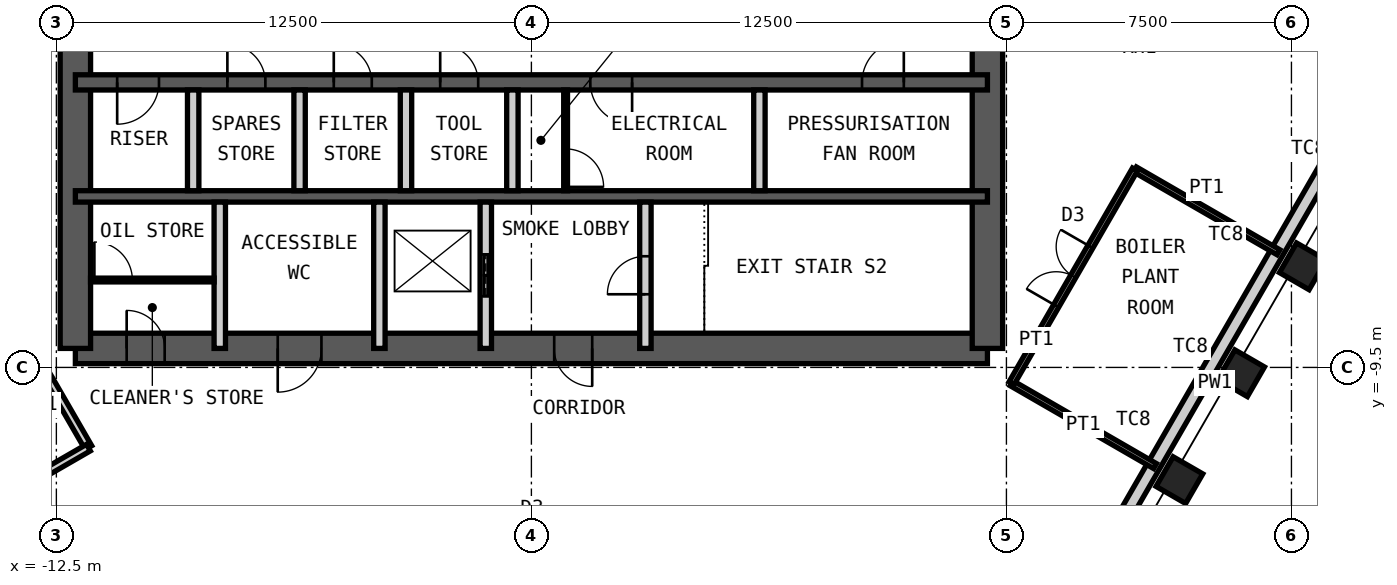
"""IFC4 building model, lengths in metres.
Left out: names, types, materials, properties, quantities, classifications, styles, units other than length and angle.
Written with IfcOpenShell. Run it as: python <this file> out.ifc"""

import sys

from ifc_helpers import new_model, si_unit, direction, frame, frame_2d, origin, origin_2d, place, context, subcontext, project, spatial, rectangle, hollow_rectangle, extrude, element, fill, save


model = new_model("IFC4")
c1 = context("Model", 3, precision=1e-05, world=origin(), true_north=direction((0.0, 1.0)))
c2 = subcontext(c1, "Body", "Model", "MODEL_VIEW")
j1 = project(units=[si_unit("LENGTHUNIT", "METRE"), si_unit("PLANEANGLEUNIT", "RADIAN")], contexts=[c1])
p1 = place(None, origin())
s1 = spatial("IfcSite", under=j1, at=p1, CompositionType="ELEMENT")
p2 = place(p1, origin())
s2 = spatial("IfcBuilding", under=s1, at=p2, CompositionType="ELEMENT")
p3 = place(p2, frame((0.0, 0.0, 343.6)))
s3 = spatial("IfcBuildingStorey", under=s2, at=p3, CompositionType="ELEMENT", Elevation=343.6)
for number, where, z_axis, x_axis in (
    (1, (20.3, -6.84, 0.0), (0.0, 0.0, 1.0), (0.5, 0.866, 0.0)),
    (2, (18.676, -9.653, 0.0), (0.0, 0.0, 1.0), (0.5, 0.866, 0.0)),
    (3, (17.052, -12.466, 0.0), (0.0, 0.0, 1.0), (0.5, 0.866, 0.0)),
):
    element("IfcColumn", number, at=place(p3, frame(where, z_axis=z_axis, x_axis=x_axis)), inside=s3, PredefinedType="COLUMN", context=c2, shape_type="SweptSolid", body=[
        extrude(hollow_rectangle(XDim=0.9, YDim=0.9, WallThickness=0.05, at=origin_2d()), origin(), (0.0, 0.0, 1.0), 4.65),
    ])
p4 = place(p3, frame((-12.0, -9.0, 0.0), z_axis=(0.0, 0.0, 1.0), x_axis=(1.0, 0.0, 0.0)))
e4 = element("IfcWall", 4, at=p4, inside=s3, PredefinedType="SHEAR", context=c2, shape_type="SweptSolid", body=[
    extrude(rectangle(XDim=24.0, YDim=0.8, at=frame_2d((12.0, 0.0))), origin(), (0.0, 0.0, 1.0), 4.65),
])
p5 = place(p4, frame((1.35, 0.0, 0.0)))
e5 = element("IfcOpeningElement", 5, at=p5, cuts=e4, PredefinedType="OPENING", context=c2, shape_type="SweptSolid", body=[
    extrude(rectangle(XDim=1.0, YDim=2.1, at=frame_2d((0.5, 1.05))), frame((0.0, 0.41, 0.0), z_axis=(0.0, -1.0, 0.0), x_axis=(1.0, 0.0, 0.0)), (0.0, 0.0, 1.0), 0.82),
])
p6 = place(p4, frame((5.325, 0.0, 0.0)))
e6 = element("IfcOpeningElement", 6, at=p6, cuts=e4, PredefinedType="OPENING", context=c2, shape_type="SweptSolid", body=[
    extrude(rectangle(XDim=1.15, YDim=2.1, at=frame_2d((0.575, 1.05))), frame((0.0, 0.41, 0.0), z_axis=(0.0, -1.0, 0.0), x_axis=(1.0, 0.0, 0.0)), (0.0, 0.0, 1.0), 0.82),
])
p7 = place(p4, frame((12.6, 0.0, 0.0)))
e7 = element("IfcOpeningElement", 7, at=p7, cuts=e4, PredefinedType="OPENING", context=c2, shape_type="SweptSolid", body=[
    extrude(rectangle(XDim=1.0, YDim=2.1, at=frame_2d((0.5, 1.05))), frame((0.0, 0.41, 0.0), z_axis=(0.0, -1.0, 0.0), x_axis=(1.0, 0.0, 0.0)), (0.0, 0.0, 1.0), 0.82),
])
p8 = place(p3, frame((12.0, -9.0, 0.0), z_axis=(0.0, 0.0, 1.0), x_axis=(0.0, 1.0, 0.0)))
e8 = element("IfcWall", 8, at=p8, inside=s3, PredefinedType="SHEAR", context=c2, shape_type="SweptSolid", body=[
    extrude(rectangle(XDim=18.0, YDim=0.8, at=frame_2d((9.0, 0.0))), origin(), (0.0, 0.0, 1.0), 4.65),
])
p9 = place(p8, frame((8.1, 0.0, 0.0)))
e9 = element("IfcOpeningElement", 9, at=p9, cuts=e8, PredefinedType="OPENING", context=c2, shape_type="SweptSolid", body=[
    extrude(rectangle(XDim=1.8, YDim=2.1, at=frame_2d((0.9, 1.05))), frame((0.0, 0.41, 0.0), z_axis=(0.0, -1.0, 0.0), x_axis=(1.0, 0.0, 0.0)), (0.0, 0.0, 1.0), 0.82),
])
p10 = place(p3, frame((-12.0, -9.0, 0.0), z_axis=(0.0, 0.0, 1.0), x_axis=(0.0, 1.0, 0.0)))
e10 = element("IfcWall", 10, at=p10, inside=s3, PredefinedType="SHEAR", context=c2, shape_type="SweptSolid", body=[
    extrude(rectangle(XDim=18.0, YDim=0.8, at=frame_2d((9.0, 0.0))), origin(), (0.0, 0.0, 1.0), 4.65),
])
p11 = place(p10, frame((8.1, 0.0, 0.0)))
e11 = element("IfcOpeningElement", 11, at=p11, cuts=e10, PredefinedType="OPENING", context=c2, shape_type="SweptSolid", body=[
    extrude(rectangle(XDim=1.8, YDim=2.1, at=frame_2d((0.9, 1.05))), frame((0.0, 0.41, 0.0), z_axis=(0.0, -1.0, 0.0), x_axis=(1.0, 0.0, 0.0)), (0.0, 0.0, 1.0), 0.82),
])
p12 = place(p3, frame((-12.0, -2.0, 0.0), z_axis=(0.0, 0.0, 1.0), x_axis=(1.0, 0.0, 0.0)))
e12 = element("IfcWall", 12, at=p12, inside=s3, PredefinedType="SHEAR", context=c2, shape_type="SweptSolid", body=[
    extrude(rectangle(XDim=24.0, YDim=0.4, at=frame_2d((12.0, 0.0))), origin(), (0.0, 0.0, 1.0), 4.65),
])
p13 = place(p12, frame((1.1, 0.0, 0.0)))
e13 = element("IfcOpeningElement", 13, at=p13, cuts=e12, PredefinedType="OPENING", context=c2, shape_type="SweptSolid", body=[
    extrude(rectangle(XDim=1.1, YDim=2.1, at=frame_2d((0.55, 1.05))), frame((0.0, 0.21, 0.0), z_axis=(0.0, -1.0, 0.0), x_axis=(1.0, 0.0, 0.0)), (0.0, 0.0, 1.0), 0.42),
])
p14 = place(p12, frame((13.55, 0.0, 0.0)))
e14 = element("IfcOpeningElement", 14, at=p14, cuts=e12, PredefinedType="OPENING", context=c2, shape_type="SweptSolid", body=[
    extrude(rectangle(XDim=1.1, YDim=2.1, at=frame_2d((0.55, 1.05))), frame((0.0, 0.21, 0.0), z_axis=(0.0, -1.0, 0.0), x_axis=(1.0, 0.0, 0.0)), (0.0, 0.0, 1.0), 0.42),
])
p15 = place(p12, frame((20.7, 0.0, 0.0)))
e15 = element("IfcOpeningElement", 15, at=p15, cuts=e12, PredefinedType="OPENING", context=c2, shape_type="SweptSolid", body=[
    extrude(rectangle(XDim=1.1, YDim=2.1, at=frame_2d((0.55, 1.05))), frame((0.0, 0.21, 0.0), z_axis=(0.0, -1.0, 0.0), x_axis=(1.0, 0.0, 0.0)), (0.0, 0.0, 1.0), 0.42),
])
p16 = place(p12, frame((4.0, 0.0, 0.0)))
e16 = element("IfcOpeningElement", 16, at=p16, cuts=e12, PredefinedType="OPENING", context=c2, shape_type="SweptSolid", body=[
    extrude(rectangle(XDim=1.0, YDim=2.1, at=frame_2d((0.5, 1.05))), frame((0.0, 0.21, 0.0), z_axis=(0.0, -1.0, 0.0), x_axis=(1.0, 0.0, 0.0)), (0.0, 0.0, 1.0), 0.42),
])
p17 = place(p12, frame((6.8, 0.0, 0.0)))
e17 = element("IfcOpeningElement", 17, at=p17, cuts=e12, PredefinedType="OPENING", context=c2, shape_type="SweptSolid", body=[
    extrude(rectangle(XDim=1.0, YDim=2.1, at=frame_2d((0.5, 1.05))), frame((0.0, 0.21, 0.0), z_axis=(0.0, -1.0, 0.0), x_axis=(1.0, 0.0, 0.0)), (0.0, 0.0, 1.0), 0.42),
])
p18 = place(p12, frame((9.6, 0.0, 0.0)))
e18 = element("IfcOpeningElement", 18, at=p18, cuts=e12, PredefinedType="OPENING", context=c2, shape_type="SweptSolid", body=[
    extrude(rectangle(XDim=1.0, YDim=2.1, at=frame_2d((0.5, 1.05))), frame((0.0, 0.21, 0.0), z_axis=(0.0, -1.0, 0.0), x_axis=(1.0, 0.0, 0.0)), (0.0, 0.0, 1.0), 0.42),
])
p19 = place(p3, frame((-12.0, -5.0, 0.0), z_axis=(0.0, 0.0, 1.0), x_axis=(1.0, 0.0, 0.0)))
e19 = element("IfcWall", 19, at=p19, inside=s3, PredefinedType="SHEAR", context=c2, shape_type="SweptSolid", body=[
    extrude(rectangle(XDim=24.0, YDim=0.3, at=frame_2d((12.0, 0.0))), origin(), (0.0, 0.0, 1.0), 4.65),
])
for number, where, z_axis, x_axis in (
    (20, (-8.9, -4.85, 0.0), (0.0, 0.0, 1.0), (0.0, 1.0, 0.0)),
    (21, (-6.1, -4.85, 0.0), (0.0, 0.0, 1.0), (0.0, 1.0, 0.0)),
    (22, (-3.3, -4.85, 0.0), (0.0, 0.0, 1.0), (0.0, 1.0, 0.0)),
):
    element("IfcWall", number, at=place(p3, frame(where, z_axis=z_axis, x_axis=x_axis)), inside=s3, PredefinedType="PARTITIONING", context=c2, shape_type="SweptSolid", body=[
        extrude(rectangle(XDim=2.65, YDim=0.3, at=frame_2d((1.325, 0.0))), origin(), (0.0, 0.0, 1.0), 4.65),
    ])
p20 = place(p3, frame((-0.5, -4.85, 0.0), z_axis=(0.0, 0.0, 1.0), x_axis=(0.0, 1.0, 0.0)))
e23 = element("IfcWall", 23, at=p20, inside=s3, PredefinedType="PARTITIONING", context=c2, shape_type="SweptSolid", body=[
    extrude(rectangle(XDim=2.65, YDim=0.3, at=frame_2d((1.325, 0.0))), origin(), (0.0, 0.0, 1.0), 3.65),
])
p21 = place(p3, frame((6.0, -4.85, 0.0), z_axis=(0.0, 0.0, 1.0), x_axis=(0.0, 1.0, 0.0)))
e24 = element("IfcWall", 24, at=p21, inside=s3, PredefinedType="PARTITIONING", context=c2, shape_type="SweptSolid", body=[
    extrude(rectangle(XDim=2.65, YDim=0.3, at=frame_2d((1.325, 0.0))), origin(), (0.0, 0.0, 1.0), 4.65),
])
for number, where, z_axis, x_axis in (
    (25, (-8.2, -9.0, 0.0), (0.0, 0.0, 1.0), (0.0, 1.0, 0.0)),
    (26, (-4.0, -9.0, 0.0), (0.0, 0.0, 1.0), (0.0, 1.0, 0.0)),
):
    element("IfcWall", number, at=place(p3, frame(where, z_axis=z_axis, x_axis=x_axis)), inside=s3, PredefinedType="PARTITIONING", context=c2, shape_type="SweptSolid", body=[
        extrude(rectangle(XDim=3.85, YDim=0.3, at=frame_2d((1.925, 0.0))), origin(), (0.0, 0.0, 1.0), 4.65),
    ])
p22 = place(p3, frame((-1.2, -9.0, 0.0), z_axis=(0.0, 0.0, 1.0), x_axis=(0.0, 1.0, 0.0)))
e27 = element("IfcWall", 27, at=p22, inside=s3, PredefinedType="PARTITIONING", context=c2, shape_type="SweptSolid", body=[
    extrude(rectangle(XDim=3.85, YDim=0.3, at=frame_2d((1.925, 0.0))), origin(), (0.0, 0.0, 1.0), 4.65),
])
p23 = place(p22, frame((1.375, 0.0, 0.0)))
e28 = element("IfcOpeningElement", 28, at=p23, cuts=e27, PredefinedType="OPENING", context=c2, shape_type="SweptSolid", body=[
    extrude(rectangle(XDim=1.1, YDim=2.4, at=frame_2d((0.55, 1.2))), frame((0.0, 0.16, 0.0), z_axis=(0.0, -1.0, 0.0), x_axis=(1.0, 0.0, 0.0)), (0.0, 0.0, 1.0), 0.32),
])
p24 = place(p3, frame((3.0, -9.0, 0.0), z_axis=(0.0, 0.0, 1.0), x_axis=(0.0, 1.0, 0.0)))
e29 = element("IfcWall", 29, at=p24, inside=s3, PredefinedType="PARTITIONING", context=c2, shape_type="SweptSolid", body=[
    extrude(rectangle(XDim=3.85, YDim=0.3, at=frame_2d((1.925, 0.0))), origin(), (0.0, 0.0, 1.0), 4.65),
])
p25 = place(p24, frame((1.425, 0.0, 0.0)))
e30 = element("IfcOpeningElement", 30, at=p25, cuts=e29, PredefinedType="OPENING", context=c2, shape_type="SweptSolid", body=[
    extrude(rectangle(XDim=1.0, YDim=2.1, at=frame_2d((0.5, 1.05))), frame((0.0, 0.16, 0.0), z_axis=(0.0, -1.0, 0.0), x_axis=(1.0, 0.0, 0.0)), (0.0, 0.0, 1.0), 0.32),
])
for number, where, z_axis, x_axis in (
    (31, (22.634, -1.246, 5.0), (0.0, 0.0, 1.0), (-0.5, -0.866, 0.0)),
    (32, (-12.396, -18.979, 5.0), (0.0, 0.0, 1.0), (-0.5, 0.866, 0.0)),
):
    element("IfcWall", number, at=place(p3, frame(where, z_axis=z_axis, x_axis=x_axis)), inside=s3, PredefinedType="PARAPET", context=c2, shape_type="SweptSolid", body=[
        extrude(rectangle(XDim=18.592, YDim=0.35, at=frame_2d((9.296, 0.0))), origin(), (0.0, 0.0, 1.0), 1.2),
    ])
p26 = place(p3, frame((0.9, -4.85, 0.0), z_axis=(0.0, 0.0, 1.0), x_axis=(0.0, 1.0, 0.0)))
e33 = element("IfcWall", 33, at=p26, inside=s3, PredefinedType="PARTITIONING", context=c2, shape_type="SweptSolid", body=[
    extrude(rectangle(XDim=2.65, YDim=0.1, at=frame_2d((1.325, 0.0))), origin(), (0.0, 0.0, 1.0), 5.0),
])
p27 = place(p26, frame((0.1, 0.0, 0.0)))
e34 = element("IfcOpeningElement", 34, at=p27, cuts=e33, PredefinedType="OPENING", context=c2, shape_type="SweptSolid", body=[
    extrude(rectangle(XDim=1.0, YDim=2.4, at=frame_2d((0.5, 1.2))), frame((0.0, 0.06, 0.0), z_axis=(0.0, -1.0, 0.0), x_axis=(1.0, 0.0, 0.0)), (0.0, 0.0, 1.0), 0.12),
])
p28 = place(p3, frame((-11.6, -7.2, 0.0), z_axis=(0.0, 0.0, 1.0), x_axis=(1.0, 0.0, 0.0)))
e35 = element("IfcWall", 35, at=p28, inside=s3, PredefinedType="PARTITIONING", context=c2, shape_type="SweptSolid", body=[
    extrude(rectangle(XDim=3.25, YDim=0.1, at=frame_2d((1.625, 0.0))), origin(), (0.0, 0.0, 1.0), 5.0),
])
p29 = place(p28, frame((0.1, 0.0, 0.0)))
e36 = element("IfcOpeningElement", 36, at=p29, cuts=e35, PredefinedType="OPENING", context=c2, shape_type="SweptSolid", body=[
    extrude(rectangle(XDim=1.0, YDim=2.4, at=frame_2d((0.5, 1.2))), frame((0.0, 0.06, 0.0), z_axis=(0.0, -1.0, 0.0), x_axis=(1.0, 0.0, 0.0)), (0.0, 0.0, 1.0), 0.12),
])
p30 = place(p3, frame((19.659, -6.47, 0.0), z_axis=(0.0, 0.0, 1.0), x_axis=(-0.866032659912, 0.499987431809, 0.0)))
e37 = element("IfcWall", 37, at=p30, inside=s3, PredefinedType="PARTITIONING", context=c2, shape_type="SweptSolid", body=[
    extrude(rectangle(XDim=4.36, YDim=0.15, at=frame_2d((2.18, 0.0))), origin(), (0.0, 0.0, 1.0), 4.65),
])
p31 = place(p3, frame((16.411, -12.096, 0.0), z_axis=(0.0, 0.0, 1.0), x_axis=(-0.866032659912, 0.499987431809, 0.0)))
e38 = element("IfcWall", 38, at=p31, inside=s3, PredefinedType="PARTITIONING", context=c2, shape_type="SweptSolid", body=[
    extrude(rectangle(XDim=4.36, YDim=0.15, at=frame_2d((2.18, 0.0))), origin(), (0.0, 0.0, 1.0), 3.75),
])
p32 = place(p3, frame((15.883, -4.29, 0.0), z_axis=(0.0, 0.0, 1.0), x_axis=(-0.500003318956, -0.866023487576, 0.0)))
e39 = element("IfcWall", 39, at=p32, inside=s3, PredefinedType="PARTITIONING", context=c2, shape_type="SweptSolid", body=[
    extrude(rectangle(XDim=6.496, YDim=0.15, at=frame_2d((3.248, 0.0))), origin(), (0.0, 0.0, 1.0), 4.65),
])
p33 = place(p32, frame((2.348, 0.0, 0.0)))
e40 = element("IfcOpeningElement", 40, at=p33, cuts=e39, PredefinedType="OPENING", context=c2, shape_type="SweptSolid", body=[
    extrude(rectangle(XDim=1.8, YDim=2.4, at=frame_2d((0.9, 1.2))), frame((0.0, 0.085, 0.0), z_axis=(0.0, -1.0, 0.0), x_axis=(1.0, 0.0, 0.0)), (0.0, 0.0, 1.0), 0.17),
])
p34 = place(p3, frame((-11.657, -11.61, 0.0), z_axis=(0.0, 0.0, 1.0), x_axis=(-0.500003318956, 0.866023487576, 0.0)))
e41 = element("IfcWall", 41, at=p34, inside=s3, PredefinedType="PARTITIONING", context=c2, shape_type="SweptSolid", body=[
    extrude(rectangle(XDim=6.496, YDim=0.2, at=frame_2d((3.248, 0.0))), origin(), (0.0, 0.0, 1.0), 4.65),
])
p35 = place(p34, frame((4.197, 0.0, 0.0)))
e42 = element("IfcOpeningElement", 42, at=p35, cuts=e41, PredefinedType="OPENING", context=c2, shape_type="SweptSolid", body=[
    extrude(rectangle(XDim=2.0, YDim=2.4, at=frame_2d((1.0, 1.2))), frame((0.0, 0.11, 0.0), z_axis=(0.0, -1.0, 0.0), x_axis=(1.0, 0.0, 0.0)), (0.0, 0.0, 1.0), 0.22),
])
p36 = place(p3, frame((-14.985, -13.531, 0.0), z_axis=(0.0, 0.0, 1.0), x_axis=(0.866021594059, 0.50000659858, 0.0)))
e43 = element("IfcWall", 43, at=p36, inside=s3, PredefinedType="PARTITIONING", context=c2, shape_type="SweptSolid", body=[
    extrude(rectangle(XDim=3.843, YDim=0.2, at=frame_2d((1.921, 0.0))), origin(), (0.0, 0.0, 1.0), 4.65),
])
p37 = place(p5, origin())
e44 = element("IfcDoor", 44, at=p37, inside=s3, OperationType="SINGLE_SWING_RIGHT", PredefinedType="DOOR", context=c2, shape_type="SweptSolid", body=[
    extrude(rectangle(XDim=1.0, YDim=2.1, at=frame_2d((0.5, 1.05))), frame((0.0, 0.025, 0.0), z_axis=(0.0, -1.0, 0.0), x_axis=(1.0, 0.0, 0.0)), (0.0, 0.0, 1.0), 0.05),
])
fill(e5, e44)
p38 = place(p6, origin())
e45 = element("IfcDoor", 45, at=p38, inside=s3, OperationType="SINGLE_SWING_LEFT", PredefinedType="DOOR", context=c2, shape_type="SweptSolid", body=[
    extrude(rectangle(XDim=1.15, YDim=2.1, at=frame_2d((0.575, 1.05))), frame((0.0, 0.025, 0.0), z_axis=(0.0, -1.0, 0.0), x_axis=(1.0, 0.0, 0.0)), (0.0, 0.0, 1.0), 0.05),
])
fill(e6, e45)
p39 = place(p7, origin())
e46 = element("IfcDoor", 46, at=p39, inside=s3, OperationType="SINGLE_SWING_RIGHT", PredefinedType="DOOR", context=c2, shape_type="SweptSolid", body=[
    extrude(rectangle(XDim=1.0, YDim=2.1, at=frame_2d((0.5, 1.05))), frame((0.0, 0.025, 0.0), z_axis=(0.0, -1.0, 0.0), x_axis=(1.0, 0.0, 0.0)), (0.0, 0.0, 1.0), 0.05),
])
fill(e7, e46)
p40 = place(p25, origin())
e47 = element("IfcDoor", 47, at=p40, inside=s3, OperationType="SINGLE_SWING_RIGHT", PredefinedType="DOOR", context=c2, shape_type="SweptSolid", body=[
    extrude(rectangle(XDim=1.0, YDim=2.1, at=frame_2d((0.5, 1.05))), frame((0.0, 0.025, 0.0), z_axis=(0.0, -1.0, 0.0), x_axis=(1.0, 0.0, 0.0)), (0.0, 0.0, 1.0), 0.05),
])
fill(e30, e47)
p41 = place(p13, origin())
e48 = element("IfcDoor", 48, at=p41, inside=s3, OperationType="SINGLE_SWING_LEFT", PredefinedType="DOOR", context=c2, shape_type="SweptSolid", body=[
    extrude(rectangle(XDim=1.1, YDim=2.1, at=frame_2d((0.55, 1.05))), frame((0.0, 0.025, 0.0), z_axis=(0.0, -1.0, 0.0), x_axis=(1.0, 0.0, 0.0)), (0.0, 0.0, 1.0), 0.05),
])
fill(e13, e48)
p42 = place(p14, origin())
e49 = element("IfcDoor", 49, at=p42, inside=s3, OperationType="SINGLE_SWING_RIGHT", PredefinedType="DOOR", context=c2, shape_type="SweptSolid", body=[
    extrude(rectangle(XDim=1.1, YDim=2.1, at=frame_2d((0.55, 1.05))), frame((0.0, 0.025, 0.0), z_axis=(0.0, -1.0, 0.0), x_axis=(1.0, 0.0, 0.0)), (0.0, 0.0, 1.0), 0.05),
])
fill(e14, e49)
p43 = place(p15, origin())
e50 = element("IfcDoor", 50, at=p43, inside=s3, OperationType="SINGLE_SWING_LEFT", PredefinedType="DOOR", context=c2, shape_type="SweptSolid", body=[
    extrude(rectangle(XDim=1.1, YDim=2.1, at=frame_2d((0.55, 1.05))), frame((0.0, 0.025, 0.0), z_axis=(0.0, -1.0, 0.0), x_axis=(1.0, 0.0, 0.0)), (0.0, 0.0, 1.0), 0.05),
])
fill(e15, e50)
p44 = place(p23, origin())
e51 = element("IfcDoor", 51, at=p44, inside=s3, OperationType="DOUBLE_DOOR_SLIDING", PredefinedType="DOOR", context=c2, shape_type="SweptSolid", body=[
    extrude(rectangle(XDim=1.1, YDim=2.4, at=frame_2d((0.55, 1.2))), frame((0.0, 0.025, 0.0), z_axis=(0.0, -1.0, 0.0), x_axis=(1.0, 0.0, 0.0)), (0.0, 0.0, 1.0), 0.05),
])
fill(e28, e51)
p45 = place(p16, origin())
e52 = element("IfcDoor", 52, at=p45, inside=s3, OperationType="SINGLE_SWING_RIGHT", PredefinedType="DOOR", context=c2, shape_type="SweptSolid", body=[
    extrude(rectangle(XDim=1.0, YDim=2.1, at=frame_2d((0.5, 1.05))), frame((0.0, 0.025, 0.0), z_axis=(0.0, -1.0, 0.0), x_axis=(1.0, 0.0, 0.0)), (0.0, 0.0, 1.0), 0.05),
])
fill(e16, e52)
p46 = place(p17, origin())
e53 = element("IfcDoor", 53, at=p46, inside=s3, OperationType="SINGLE_SWING_RIGHT", PredefinedType="DOOR", context=c2, shape_type="SweptSolid", body=[
    extrude(rectangle(XDim=1.0, YDim=2.1, at=frame_2d((0.5, 1.05))), frame((0.0, 0.025, 0.0), z_axis=(0.0, -1.0, 0.0), x_axis=(1.0, 0.0, 0.0)), (0.0, 0.0, 1.0), 0.05),
])
fill(e17, e53)
p47 = place(p18, origin())
e54 = element("IfcDoor", 54, at=p47, inside=s3, OperationType="SINGLE_SWING_RIGHT", PredefinedType="DOOR", context=c2, shape_type="SweptSolid", body=[
    extrude(rectangle(XDim=1.0, YDim=2.1, at=frame_2d((0.5, 1.05))), frame((0.0, 0.025, 0.0), z_axis=(0.0, -1.0, 0.0), x_axis=(1.0, 0.0, 0.0)), (0.0, 0.0, 1.0), 0.05),
])
fill(e18, e54)
p48 = place(p27, origin())
e55 = element("IfcDoor", 55, at=p48, inside=s3, OperationType="SINGLE_SWING_LEFT", PredefinedType="DOOR", context=c2, shape_type="SweptSolid", body=[
    extrude(rectangle(XDim=1.0, YDim=2.4, at=frame_2d((0.5, 1.2))), frame((0.0, 0.025, 0.0), z_axis=(0.0, -1.0, 0.0), x_axis=(1.0, 0.0, 0.0)), (0.0, 0.0, 1.0), 0.05),
])
fill(e34, e55)
p49 = place(p29, origin())
e56 = element("IfcDoor", 56, at=p49, inside=s3, OperationType="SINGLE_SWING_RIGHT", PredefinedType="DOOR", context=c2, shape_type="SweptSolid", body=[
    extrude(rectangle(XDim=1.0, YDim=2.4, at=frame_2d((0.5, 1.2))), frame((0.0, 0.025, 0.0), z_axis=(0.0, -1.0, 0.0), x_axis=(1.0, 0.0, 0.0)), (0.0, 0.0, 1.0), 0.05),
])
fill(e36, e56)
p50 = place(p33, origin())
e57 = element("IfcDoor", 57, at=p50, inside=s3, OperationType="DOUBLE_DOOR_DOUBLE_SWING", PredefinedType="DOOR", context=c2, shape_type="SweptSolid", body=[
    extrude(rectangle(XDim=1.8, YDim=2.4, at=frame_2d((0.9, 1.2))), frame((0.0, 0.025, 0.0), z_axis=(0.0, -1.0, 0.0), x_axis=(1.0, 0.0, 0.0)), (0.0, 0.0, 1.0), 0.05),
])
fill(e40, e57)
save(model, sys.argv[1])
